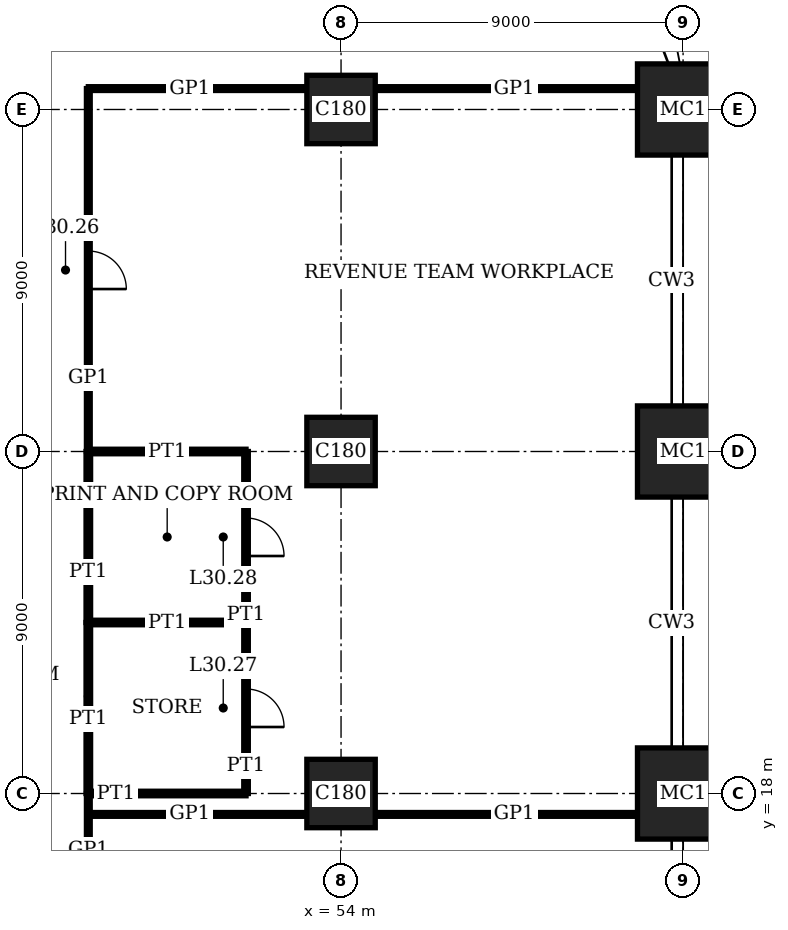
"""IFC4 building model, lengths in metres.
Left out: names, types, materials, properties, quantities, classifications, styles, units other than length and angle.
Written with IfcOpenShell. Run it as: python <this file> out.ifc"""

import sys

from ifc_helpers import new_model, si_unit, direction, frame, frame_2d, origin, origin_2d, place, context, subcontext, project, spatial, rectangle, extrude, element, fill, save


model = new_model("IFC4")
c1 = context("Model", 3, precision=1e-05, world=origin(), true_north=direction((0.0, 1.0)))
c2 = subcontext(c1, "Body", "Model", "MODEL_VIEW")
j1 = project(units=[si_unit("LENGTHUNIT", "METRE"), si_unit("PLANEANGLEUNIT", "RADIAN")], contexts=[c1])
p1 = place(None, origin())
s1 = spatial("IfcSite", under=j1, at=p1, CompositionType="ELEMENT")
p2 = place(p1, origin())
s2 = spatial("IfcBuilding", under=s1, at=p2, CompositionType="ELEMENT")
p3 = place(p2, frame((0.0, 0.0, 125.0)))
s3 = spatial("IfcBuildingStorey", under=s2, at=p3, CompositionType="ELEMENT", Elevation=125.0)
for number, where, z_axis, x_axis in (
    (1, (54.0, 18.0, 0.0), (0.0, 0.0, 1.0), (1.0, 0.0, 0.0)),
    (2, (54.0, 27.0, 0.0), (0.0, 0.0, 1.0), (1.0, 0.0, 0.0)),
    (3, (54.0, 36.0, 0.0), (0.0, 0.0, 1.0), (1.0, 0.0, 0.0)),
):
    element("IfcColumn", number, at=place(p3, frame(where, z_axis=z_axis, x_axis=x_axis)), inside=s3, PredefinedType="COLUMN", context=c2, shape_type="SweptSolid", body=[
        extrude(rectangle(XDim=1.8, YDim=1.8, at=origin_2d()), origin(), (0.0, 0.0, 1.0), 4.0),
    ])
for number, where, z_axis, x_axis in (
    (4, (63.0, 18.0, 0.0), (0.0, 0.0, 1.0), (1.0, 0.0, 0.0)),
    (5, (63.0, 27.0, 0.0), (0.0, 0.0, 1.0), (1.0, 0.0, 0.0)),
    (6, (63.0, 36.0, 0.0), (0.0, 0.0, 1.0), (1.0, 0.0, 0.0)),
):
    element("IfcColumn", number, at=place(p3, frame(where, z_axis=z_axis, x_axis=x_axis)), inside=s3, PredefinedType="COLUMN", context=c2, shape_type="SweptSolid", body=[
        extrude(rectangle(XDim=2.4, YDim=2.4, at=origin_2d()), origin(), (0.0, 0.0, 1.0), 4.0),
    ])
p4 = place(p3, frame((47.35, 17.45, 0.0), z_axis=(0.0, 0.0, 1.0), x_axis=(1.0, 0.0, 0.0)))
e7 = element("IfcWall", 7, at=p4, inside=s3, PredefinedType="PARTITIONING", context=c2, shape_type="SweptSolid", body=[
    extrude(rectangle(XDim=5.75, YDim=0.1, at=frame_2d((2.875, 0.0))), origin(), (0.0, 0.0, 1.0), 3.75),
])
p5 = place(p3, frame((54.9, 17.45, 0.0), z_axis=(0.0, 0.0, 1.0), x_axis=(1.0, 0.0, 0.0)))
e8 = element("IfcWall", 8, at=p5, inside=s3, PredefinedType="PARTITIONING", context=c2, shape_type="SweptSolid", body=[
    extrude(rectangle(XDim=6.9, YDim=0.1, at=frame_2d((3.45, 0.0))), origin(), (0.0, 0.0, 1.0), 3.75),
])
p6 = place(p3, frame((47.35, 18.0, 0.0), z_axis=(0.0, 0.0, 1.0), x_axis=(1.0, 0.0, 0.0)))
e9 = element("IfcWall", 9, at=p6, inside=s3, PredefinedType="PARTITIONING", context=c2, shape_type="SweptSolid", body=[
    extrude(rectangle(XDim=4.15, YDim=0.12, at=frame_2d((2.075, 0.0))), origin(), (0.0, 0.0, 1.0), 3.05),
])
p7 = place(p3, frame((47.35, 22.5, 0.0), z_axis=(0.0, 0.0, 1.0), x_axis=(1.0, 0.0, 0.0)))
e10 = element("IfcWall", 10, at=p7, inside=s3, PredefinedType="PARTITIONING", context=c2, shape_type="SweptSolid", body=[
    extrude(rectangle(XDim=4.15, YDim=0.12, at=frame_2d((2.075, 0.0))), origin(), (0.0, 0.0, 1.0), 3.1),
])
p8 = place(p3, frame((47.35, 27.0, 0.0), z_axis=(0.0, 0.0, 1.0), x_axis=(1.0, 0.0, 0.0)))
e11 = element("IfcWall", 11, at=p8, inside=s3, PredefinedType="PARTITIONING", context=c2, shape_type="SweptSolid", body=[
    extrude(rectangle(XDim=4.15, YDim=0.12, at=frame_2d((2.075, 0.0))), origin(), (0.0, 0.0, 1.0), 3.05),
])
p9 = place(p3, frame((47.35, 36.55, 0.0), z_axis=(0.0, 0.0, 1.0), x_axis=(1.0, 0.0, 0.0)))
e12 = element("IfcWall", 12, at=p9, inside=s3, PredefinedType="PARTITIONING", context=c2, shape_type="SweptSolid", body=[
    extrude(rectangle(XDim=5.75, YDim=0.1, at=frame_2d((2.875, 0.0))), origin(), (0.0, 0.0, 1.0), 3.75),
])
p10 = place(p3, frame((54.9, 36.55, 0.0), z_axis=(0.0, 0.0, 1.0), x_axis=(1.0, 0.0, 0.0)))
e13 = element("IfcWall", 13, at=p10, inside=s3, PredefinedType="PARTITIONING", context=c2, shape_type="SweptSolid", body=[
    extrude(rectangle(XDim=6.9, YDim=0.1, at=frame_2d((3.45, 0.0))), origin(), (0.0, 0.0, 1.0), 3.75),
])
for number, where, z_axis, x_axis in (
    (14, (47.35, 18.0, 0.0), (0.0, 0.0, 1.0), (0.0, 1.0, 0.0)),
    (15, (47.35, 22.5, 0.0), (0.0, 0.0, 1.0), (0.0, 1.0, 0.0)),
):
    element("IfcWall", number, at=place(p3, frame(where, z_axis=z_axis, x_axis=x_axis)), inside=s3, PredefinedType="PARTITIONING", context=c2, shape_type="SweptSolid", body=[
        extrude(rectangle(XDim=4.5, YDim=0.12, at=frame_2d((2.25, 0.0))), origin(), (0.0, 0.0, 1.0), 3.75),
    ])
p11 = place(p3, frame((47.35, 15.65, 0.0), z_axis=(0.0, 0.0, 1.0), x_axis=(0.0, 1.0, 0.0)))
e16 = element("IfcWall", 16, at=p11, inside=s3, PredefinedType="PARTITIONING", context=c2, shape_type="SweptSolid", body=[
    extrude(rectangle(XDim=2.35, YDim=0.1, at=frame_2d((1.175, 0.0))), origin(), (0.0, 0.0, 1.0), 3.75),
])
p12 = place(p3, frame((47.35, 27.0, 0.0), z_axis=(0.0, 0.0, 1.0), x_axis=(0.0, 1.0, 0.0)))
e17 = element("IfcWall", 17, at=p12, inside=s3, PredefinedType="PARTITIONING", context=c2, shape_type="SweptSolid", body=[
    extrude(rectangle(XDim=9.55, YDim=0.1, at=frame_2d((4.775, 0.0))), origin(), (0.0, 0.0, 1.0), 3.75),
])
p13 = place(p12, frame((4.275, 0.0, 0.0)))
e18 = element("IfcOpeningElement", 18, at=p13, cuts=e17, PredefinedType="OPENING", context=c2, shape_type="SweptSolid", body=[
    extrude(rectangle(XDim=1.0, YDim=2.4, at=frame_2d((0.5, 1.2))), frame((0.0, 0.06, 0.0), z_axis=(0.0, -1.0, 0.0), x_axis=(1.0, 0.0, 0.0)), (0.0, 0.0, 1.0), 0.12),
])
p14 = place(p3, frame((51.5, 18.0, 0.0), z_axis=(0.0, 0.0, 1.0), x_axis=(0.0, 1.0, 0.0)))
e19 = element("IfcWall", 19, at=p14, inside=s3, PredefinedType="PARTITIONING", context=c2, shape_type="SweptSolid", body=[
    extrude(rectangle(XDim=4.5, YDim=0.12, at=frame_2d((2.25, 0.0))), origin(), (0.0, 0.0, 1.0), 3.75),
])
p15 = place(p14, frame((1.75, 0.0, 0.0)))
e20 = element("IfcOpeningElement", 20, at=p15, cuts=e19, PredefinedType="OPENING", context=c2, shape_type="SweptSolid", body=[
    extrude(rectangle(XDim=1.0, YDim=2.4, at=frame_2d((0.5, 1.2))), frame((0.0, 0.07, 0.0), z_axis=(0.0, -1.0, 0.0), x_axis=(1.0, 0.0, 0.0)), (0.0, 0.0, 1.0), 0.14),
])
p16 = place(p3, frame((51.5, 22.5, 0.0), z_axis=(0.0, 0.0, 1.0), x_axis=(0.0, 1.0, 0.0)))
e21 = element("IfcWall", 21, at=p16, inside=s3, PredefinedType="PARTITIONING", context=c2, shape_type="SweptSolid", body=[
    extrude(rectangle(XDim=4.5, YDim=0.12, at=frame_2d((2.25, 0.0))), origin(), (0.0, 0.0, 1.0), 3.75),
])
p17 = place(p16, frame((1.75, 0.0, 0.0)))
e22 = element("IfcOpeningElement", 22, at=p17, cuts=e21, PredefinedType="OPENING", context=c2, shape_type="SweptSolid", body=[
    extrude(rectangle(XDim=1.0, YDim=2.4, at=frame_2d((0.5, 1.2))), frame((0.0, 0.07, 0.0), z_axis=(0.0, -1.0, 0.0), x_axis=(1.0, 0.0, 0.0)), (0.0, 0.0, 1.0), 0.14),
])
p18 = place(p13, origin())
e23 = element("IfcDoor", 23, at=p18, inside=s3, OperationType="SINGLE_SWING_LEFT", PredefinedType="DOOR", context=c2, shape_type="SweptSolid", body=[
    extrude(rectangle(XDim=1.0, YDim=2.4, at=frame_2d((0.5, 1.2))), frame((0.0, 0.02, 0.0), z_axis=(0.0, -1.0, 0.0), x_axis=(1.0, 0.0, 0.0)), (0.0, 0.0, 1.0), 0.04),
])
fill(e18, e23)
p19 = place(p15, origin())
e24 = element("IfcDoor", 24, at=p19, inside=s3, OperationType="SINGLE_SWING_LEFT", PredefinedType="DOOR", context=c2, shape_type="SweptSolid", body=[
    extrude(rectangle(XDim=1.0, YDim=2.4, at=frame_2d((0.5, 1.2))), frame((0.0, 0.025, 0.0), z_axis=(0.0, -1.0, 0.0), x_axis=(1.0, 0.0, 0.0)), (0.0, 0.0, 1.0), 0.05),
])
fill(e20, e24)
p20 = place(p17, origin())
e25 = element("IfcDoor", 25, at=p20, inside=s3, OperationType="SINGLE_SWING_LEFT", PredefinedType="DOOR", context=c2, shape_type="SweptSolid", body=[
    extrude(rectangle(XDim=1.0, YDim=2.4, at=frame_2d((0.5, 1.2))), frame((0.0, 0.025, 0.0), z_axis=(0.0, -1.0, 0.0), x_axis=(1.0, 0.0, 0.0)), (0.0, 0.0, 1.0), 0.05),
])
fill(e22, e25)
save(model, sys.argv[1])
